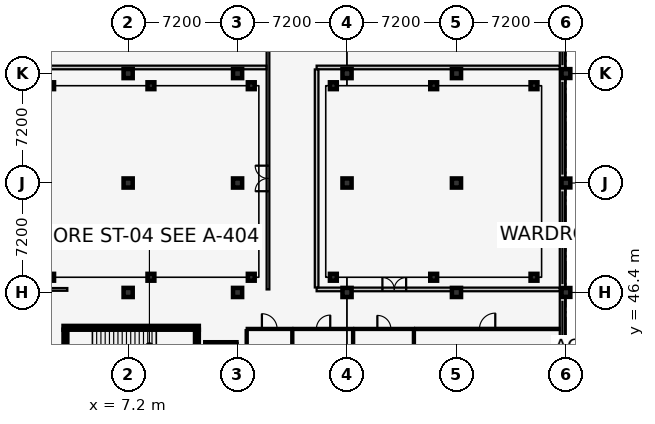
"""IFC4 building model, lengths in metres.
Left out: names, types, materials, properties, quantities, classifications, styles, units other than length and angle.
Written with IfcOpenShell. Run it as: python <this file> out.ifc"""

import sys

from ifc_helpers import new_model, si_unit, direction, frame, frame_2d, origin, origin_2d, place, context, subcontext, project, spatial, rectangle, extrude, element, fill, save


model = new_model("IFC4")
c1 = context("Model", 3, precision=1e-05, world=origin(), true_north=direction((0.0, 1.0)))
c2 = subcontext(c1, "Body", "Model", "MODEL_VIEW")
j1 = project(units=[si_unit("LENGTHUNIT", "METRE"), si_unit("PLANEANGLEUNIT", "RADIAN")], contexts=[c1])
p1 = place(None, origin())
s1 = spatial("IfcSite", under=j1, at=p1, CompositionType="ELEMENT")
p2 = place(p1, origin())
s2 = spatial("IfcBuilding", under=s1, at=p2, CompositionType="ELEMENT")
p3 = place(p2, origin())
s3 = spatial("IfcBuildingStorey", under=s2, at=p3, CompositionType="ELEMENT", Elevation=0.0)
for number, where, z_axis, x_axis in (
    (1, (7.2, 46.4, 0.0), (0.0, 0.0, 1.0), (1.0, 0.0, 0.0)),
    (2, (7.2, 53.6, 0.0), (0.0, 0.0, 1.0), (1.0, 0.0, 0.0)),
    (3, (7.2, 60.8, 0.0), (0.0, 0.0, 1.0), (1.0, 0.0, 0.0)),
    (4, (14.4, 46.4, 0.0), (0.0, 0.0, 1.0), (1.0, 0.0, 0.0)),
    (5, (14.4, 53.6, 0.0), (0.0, 0.0, 1.0), (1.0, 0.0, 0.0)),
    (6, (14.4, 60.8, 0.0), (0.0, 0.0, 1.0), (1.0, 0.0, 0.0)),
    (7, (21.6, 46.4, 0.0), (0.0, 0.0, 1.0), (1.0, 0.0, 0.0)),
    (8, (21.6, 53.6, 0.0), (0.0, 0.0, 1.0), (1.0, 0.0, 0.0)),
    (9, (21.6, 60.8, 0.0), (0.0, 0.0, 1.0), (1.0, 0.0, 0.0)),
    (10, (28.8, 46.4, 0.0), (0.0, 0.0, 1.0), (1.0, 0.0, 0.0)),
    (11, (28.8, 53.6, 0.0), (0.0, 0.0, 1.0), (1.0, 0.0, 0.0)),
    (12, (28.8, 60.8, 0.0), (0.0, 0.0, 1.0), (1.0, 0.0, 0.0)),
):
    element("IfcColumn", number, at=place(p3, frame(where, z_axis=z_axis, x_axis=x_axis)), inside=s3, PredefinedType="COLUMN", context=c2, shape_type="SweptSolid", body=[
        extrude(rectangle(XDim=0.6, YDim=0.6, at=origin_2d()), origin(), (0.0, 0.0, 1.0), 5.4),
    ])
for number, where, z_axis, x_axis in (
    (13, (36.0, 46.4, 0.0), (0.0, 0.0, 1.0), (1.0, 0.0, 0.0)),
    (14, (36.0, 53.6, 0.0), (0.0, 0.0, 1.0), (1.0, 0.0, 0.0)),
    (15, (36.0, 60.8, 0.0), (0.0, 0.0, 1.0), (1.0, 0.0, 0.0)),
):
    element("IfcColumn", number, at=place(p3, frame(where, z_axis=z_axis, x_axis=x_axis)), inside=s3, PredefinedType="COLUMN", context=c2, shape_type="SweptSolid", body=[
        extrude(rectangle(XDim=0.58, YDim=0.58, at=origin_2d()), origin(), (0.0, 0.0, 1.0), 5.4),
    ])
p4 = place(p3, frame((2.1, 47.4, -0.55), z_axis=(0.0, 0.0, 1.0), x_axis=(1.0, 0.0, 0.0)))
e16 = element("IfcColumn", 16, at=p4, inside=s3, PredefinedType="COLUMN", context=c2, shape_type="SweptSolid", body=[
    extrude(rectangle(XDim=0.45, YDim=0.45, at=origin_2d()), origin(), (0.0, 0.0, 1.0), 0.955),
])
p5 = place(p3, frame((2.1, 60.0, -0.55), z_axis=(0.0, 0.0, 1.0), x_axis=(1.0, 0.0, 0.0)))
e17 = element("IfcColumn", 17, at=p5, inside=s3, PredefinedType="COLUMN", context=c2, shape_type="SweptSolid", body=[
    extrude(rectangle(XDim=0.45, YDim=0.45, at=origin_2d()), origin(), (0.0, 0.0, 1.0), 3.625),
])
p6 = place(p3, frame((8.7, 47.4, -0.55), z_axis=(0.0, 0.0, 1.0), x_axis=(1.0, 0.0, 0.0)))
e18 = element("IfcColumn", 18, at=p6, inside=s3, PredefinedType="COLUMN", context=c2, shape_type="SweptSolid", body=[
    extrude(rectangle(XDim=0.45, YDim=0.45, at=origin_2d()), origin(), (0.0, 0.0, 1.0), 0.955),
])
p7 = place(p3, frame((8.7, 60.0, -0.55), z_axis=(0.0, 0.0, 1.0), x_axis=(1.0, 0.0, 0.0)))
e19 = element("IfcColumn", 19, at=p7, inside=s3, PredefinedType="COLUMN", context=c2, shape_type="SweptSolid", body=[
    extrude(rectangle(XDim=0.45, YDim=0.45, at=origin_2d()), origin(), (0.0, 0.0, 1.0), 3.625),
])
p8 = place(p3, frame((15.3, 47.4, -0.55), z_axis=(0.0, 0.0, 1.0), x_axis=(1.0, 0.0, 0.0)))
e20 = element("IfcColumn", 20, at=p8, inside=s3, PredefinedType="COLUMN", context=c2, shape_type="SweptSolid", body=[
    extrude(rectangle(XDim=0.45, YDim=0.45, at=origin_2d()), origin(), (0.0, 0.0, 1.0), 0.955),
])
p9 = place(p3, frame((15.3, 60.0, -0.55), z_axis=(0.0, 0.0, 1.0), x_axis=(1.0, 0.0, 0.0)))
e21 = element("IfcColumn", 21, at=p9, inside=s3, PredefinedType="COLUMN", context=c2, shape_type="SweptSolid", body=[
    extrude(rectangle(XDim=0.45, YDim=0.45, at=origin_2d()), origin(), (0.0, 0.0, 1.0), 3.625),
])
p10 = place(p3, frame((20.7, 47.4, -0.55), z_axis=(0.0, 0.0, 1.0), x_axis=(1.0, 0.0, 0.0)))
e22 = element("IfcColumn", 22, at=p10, inside=s3, PredefinedType="COLUMN", context=c2, shape_type="SweptSolid", body=[
    extrude(rectangle(XDim=0.45, YDim=0.45, at=origin_2d()), origin(), (0.0, 0.0, 1.0), 0.975),
])
p11 = place(p3, frame((20.7, 60.0, -0.55), z_axis=(0.0, 0.0, 1.0), x_axis=(1.0, 0.0, 0.0)))
e23 = element("IfcColumn", 23, at=p11, inside=s3, PredefinedType="COLUMN", context=c2, shape_type="SweptSolid", body=[
    extrude(rectangle(XDim=0.45, YDim=0.45, at=origin_2d()), origin(), (0.0, 0.0, 1.0), 3.645),
])
p12 = place(p3, frame((27.3, 47.4, -0.55), z_axis=(0.0, 0.0, 1.0), x_axis=(1.0, 0.0, 0.0)))
e24 = element("IfcColumn", 24, at=p12, inside=s3, PredefinedType="COLUMN", context=c2, shape_type="SweptSolid", body=[
    extrude(rectangle(XDim=0.45, YDim=0.45, at=origin_2d()), origin(), (0.0, 0.0, 1.0), 0.975),
])
p13 = place(p3, frame((27.3, 60.0, -0.55), z_axis=(0.0, 0.0, 1.0), x_axis=(1.0, 0.0, 0.0)))
e25 = element("IfcColumn", 25, at=p13, inside=s3, PredefinedType="COLUMN", context=c2, shape_type="SweptSolid", body=[
    extrude(rectangle(XDim=0.45, YDim=0.45, at=origin_2d()), origin(), (0.0, 0.0, 1.0), 3.645),
])
p14 = place(p3, frame((33.9, 47.4, -0.55), z_axis=(0.0, 0.0, 1.0), x_axis=(1.0, 0.0, 0.0)))
e26 = element("IfcColumn", 26, at=p14, inside=s3, PredefinedType="COLUMN", context=c2, shape_type="SweptSolid", body=[
    extrude(rectangle(XDim=0.45, YDim=0.45, at=origin_2d()), origin(), (0.0, 0.0, 1.0), 0.975),
])
p15 = place(p3, frame((33.9, 60.0, -0.55), z_axis=(0.0, 0.0, 1.0), x_axis=(1.0, 0.0, 0.0)))
e27 = element("IfcColumn", 27, at=p15, inside=s3, PredefinedType="COLUMN", context=c2, shape_type="SweptSolid", body=[
    extrude(rectangle(XDim=0.45, YDim=0.45, at=origin_2d()), origin(), (0.0, 0.0, 1.0), 3.645),
])
p16 = place(p3, frame((35.77, 68.0, 0.0), z_axis=(0.0, 0.0, 1.0), x_axis=(0.0, -1.0, 0.0)))
e28 = element("IfcWall", 28, at=p16, inside=s3, PredefinedType="SOLIDWALL", context=c2, shape_type="SweptSolid", body=[
    extrude(rectangle(XDim=28.8, YDim=0.35, at=frame_2d((14.4, 0.0))), origin(), (0.0, 0.0, 1.0), 0.85),
])
p17 = place(p3, frame((11.85, 44.075, 0.0), z_axis=(0.0, 0.0, 1.0), x_axis=(-1.0, 0.0, 0.0)))
e29 = element("IfcWall", 29, at=p17, inside=s3, PredefinedType="SHEAR", context=c2, shape_type="SweptSolid", body=[
    extrude(rectangle(XDim=8.9, YDim=0.25, at=frame_2d((4.45, 0.0))), origin(), (0.0, 0.0, 1.0), 5.14),
])
p18 = place(p3, frame((3.075, 43.95, 0.0), z_axis=(0.0, 0.0, 1.0), x_axis=(0.0, -1.0, 0.0)))
e30 = element("IfcWall", 30, at=p18, inside=s3, PredefinedType="SHEAR", context=c2, shape_type="SweptSolid", body=[
    extrude(rectangle(XDim=3.55, YDim=0.25, at=frame_2d((1.775, 0.0))), origin(), (0.0, 0.0, 1.0), 5.14),
])
p19 = place(p18, frame((1.15, 0.0, 0.0)))
e31 = element("IfcOpeningElement", 31, at=p19, cuts=e30, PredefinedType="OPENING", context=c2, shape_type="SweptSolid", body=[
    extrude(rectangle(XDim=1.25, YDim=2.15, at=frame_2d((0.625, 1.075))), frame((0.0, 0.137, 0.0), z_axis=(0.0, -1.0, 0.0), x_axis=(1.0, 0.0, 0.0)), (0.0, 0.0, 1.0), 0.274),
])
p20 = place(p3, frame((11.725, 40.4, 0.0), z_axis=(0.0, 0.0, 1.0), x_axis=(0.0, 1.0, 0.0)))
e32 = element("IfcWall", 32, at=p20, inside=s3, PredefinedType="SHEAR", context=c2, shape_type="SweptSolid", body=[
    extrude(rectangle(XDim=3.55, YDim=0.25, at=frame_2d((1.775, 0.0))), origin(), (0.0, 0.0, 1.0), 5.14),
])
p21 = place(p3, frame((14.325, 43.0, 0.0), z_axis=(0.0, 0.0, 1.0), x_axis=(-1.0, 0.0, 0.0)))
e33 = element("IfcWall", 33, at=p21, inside=s3, PredefinedType="SHEAR", context=c2, shape_type="SweptSolid", body=[
    extrude(rectangle(XDim=2.05, YDim=0.25, at=frame_2d((1.025, 0.0))), origin(), (0.0, 0.0, 1.0), 5.14),
])
p22 = place(p21, frame((0.55, 0.0, 0.0)))
e34 = element("IfcOpeningElement", 34, at=p22, cuts=e33, PredefinedType="OPENING", context=c2, shape_type="SweptSolid", body=[
    extrude(rectangle(XDim=0.95, YDim=2.1, at=frame_2d((0.475, 1.05))), frame((0.0, 0.137, 0.0), z_axis=(0.0, -1.0, 0.0), x_axis=(1.0, 0.0, 0.0)), (0.0, 0.0, 1.0), 0.274),
])
p23 = place(p3, frame((0.47, 46.6, 0.0), z_axis=(0.0, 0.0, 1.0), x_axis=(1.0, 0.0, 0.0)))
e35 = element("IfcWall", 35, at=p23, inside=s3, PredefinedType="PARTITIONING", context=c2, shape_type="SweptSolid", body=[
    extrude(rectangle(XDim=2.73, YDim=0.18, at=frame_2d((1.365, 0.0))), origin(), (0.0, 0.0, 1.0), 4.465),
])
p24 = place(p3, frame((16.4, 46.6, 0.0), z_axis=(0.0, 0.0, 1.0), x_axis=(0.0, 1.0, 0.0)))
e36 = element("IfcWall", 36, at=p24, inside=s3, PredefinedType="PARTITIONING", context=c2, shape_type="SweptSolid", body=[
    extrude(rectangle(XDim=20.93, YDim=0.18, at=frame_2d((10.465, 0.0))), origin(), (0.0, 0.0, 1.0), 5.14),
])
p25 = place(p24, frame((6.46, 0.0, 0.0)))
e37 = element("IfcOpeningElement", 37, at=p25, cuts=e36, PredefinedType="OPENING", context=c2, shape_type="SweptSolid", body=[
    extrude(rectangle(XDim=1.68, YDim=2.3, at=frame_2d((0.84, 1.15))), frame((0.0, 0.102, 0.0), z_axis=(0.0, -1.0, 0.0), x_axis=(1.0, 0.0, 0.0)), (0.0, 0.0, 1.0), 0.204),
])
p26 = place(p24, frame((17.125, 0.0, 0.0)))
e38 = element("IfcOpeningElement", 38, at=p26, cuts=e36, PredefinedType="OPENING", context=c2, shape_type="SweptSolid", body=[
    extrude(rectangle(XDim=1.28, YDim=2.2, at=frame_2d((0.64, 1.1))), frame((0.0, 0.102, 0.0), z_axis=(0.0, -1.0, 0.0), x_axis=(1.0, 0.0, 0.0)), (0.0, 0.0, 1.0), 0.204),
])
p27 = place(p3, frame((0.47, 61.2, 0.0), z_axis=(0.0, 0.0, 1.0), x_axis=(1.0, 0.0, 0.0)))
e39 = element("IfcWall", 39, at=p27, inside=s3, PredefinedType="PARTITIONING", context=c2, shape_type="SweptSolid", body=[
    extrude(rectangle(XDim=15.83, YDim=0.24, at=frame_2d((7.915, 0.0))), origin(), (0.0, 0.0, 1.0), 5.14),
])
p28 = place(p3, frame((19.6, 46.6, 0.0), z_axis=(0.0, 0.0, 1.0), x_axis=(1.0, 0.0, 0.0)))
e40 = element("IfcWall", 40, at=p28, inside=s3, PredefinedType="PARTITIONING", context=c2, shape_type="SweptSolid", body=[
    extrude(rectangle(XDim=15.985, YDim=0.24, at=frame_2d((7.992, 0.0))), origin(), (0.0, 0.0, 1.0), 4.265),
])
p29 = place(p28, frame((4.327, 0.0, 0.0)))
e41 = element("IfcOpeningElement", 41, at=p29, cuts=e40, PredefinedType="OPENING", context=c2, shape_type="SweptSolid", body=[
    extrude(rectangle(XDim=1.56, YDim=2.25, at=frame_2d((0.78, 1.125))), frame((0.0, 0.132, 0.0), z_axis=(0.0, -1.0, 0.0), x_axis=(1.0, 0.0, 0.0)), (0.0, 0.0, 1.0), 0.264),
])
p30 = place(p3, frame((19.6, 61.2, 0.0), z_axis=(0.0, 0.0, 1.0), x_axis=(1.0, 0.0, 0.0)))
e42 = element("IfcWall", 42, at=p30, inside=s3, PredefinedType="PARTITIONING", context=c2, shape_type="SweptSolid", body=[
    extrude(rectangle(XDim=15.985, YDim=0.24, at=frame_2d((7.992, 0.0))), origin(), (0.0, 0.0, 1.0), 4.265),
])
p31 = place(p3, frame((19.6, 46.73, 0.0), z_axis=(0.0, 0.0, 1.0), x_axis=(0.0, 1.0, 0.0)))
e43 = element("IfcWall", 43, at=p31, inside=s3, PredefinedType="PARTITIONING", context=c2, shape_type="SweptSolid", body=[
    extrude(rectangle(XDim=14.34, YDim=0.24, at=frame_2d((7.17, 0.0))), origin(), (0.0, 0.0, 1.0), 5.14),
])
p32 = place(p3, frame((15.0, 44.0, 0.0), z_axis=(0.0, 0.0, 1.0), x_axis=(1.0, 0.0, 0.0)))
e44 = element("IfcWall", 44, at=p32, inside=s3, PredefinedType="PARTITIONING", context=c2, shape_type="SweptSolid", body=[
    extrude(rectangle(XDim=3.0, YDim=0.14, at=frame_2d((1.5, 0.0))), origin(), (0.0, 0.0, 1.0), 5.14),
])
p33 = place(p32, frame((1.0, 0.0, 0.0)))
e45 = element("IfcOpeningElement", 45, at=p33, cuts=e44, PredefinedType="OPENING", context=c2, shape_type="SweptSolid", body=[
    extrude(rectangle(XDim=1.0, YDim=2.1, at=frame_2d((0.5, 1.05))), frame((0.0, 0.082, 0.0), z_axis=(0.0, -1.0, 0.0), x_axis=(1.0, 0.0, 0.0)), (0.0, 0.0, 1.0), 0.164),
])
p34 = place(p3, frame((15.0, 39.67, 0.0), z_axis=(0.0, 0.0, 1.0), x_axis=(0.0, 1.0, 0.0)))
e46 = element("IfcWall", 46, at=p34, inside=s3, PredefinedType="PARTITIONING", context=c2, shape_type="SweptSolid", body=[
    extrude(rectangle(XDim=4.25, YDim=0.14, at=frame_2d((2.125, 0.0))), origin(), (0.0, 0.0, 1.0), 5.14),
])
p35 = place(p3, frame((18.0, 39.67, 0.0), z_axis=(0.0, 0.0, 1.0), x_axis=(0.0, 1.0, 0.0)))
e47 = element("IfcWall", 47, at=p35, inside=s3, PredefinedType="PARTITIONING", context=c2, shape_type="SweptSolid", body=[
    extrude(rectangle(XDim=4.25, YDim=0.14, at=frame_2d((2.125, 0.0))), origin(), (0.0, 0.0, 1.0), 4.665),
])
p36 = place(p3, frame((18.08, 44.0, 0.0), z_axis=(0.0, 0.0, 1.0), x_axis=(1.0, 0.0, 0.0)))
e48 = element("IfcWall", 48, at=p36, inside=s3, PredefinedType="PARTITIONING", context=c2, shape_type="SweptSolid", body=[
    extrude(rectangle(XDim=3.92, YDim=0.14, at=frame_2d((1.96, 0.0))), origin(), (0.0, 0.0, 1.0), 5.14),
])
p37 = place(p36, frame((1.505, 0.0, 0.0)))
e49 = element("IfcOpeningElement", 49, at=p37, cuts=e48, PredefinedType="OPENING", context=c2, shape_type="SweptSolid", body=[
    extrude(rectangle(XDim=0.91, YDim=2.06, at=frame_2d((0.455, 1.03))), frame((0.0, 0.082, 0.0), z_axis=(0.0, -1.0, 0.0), x_axis=(1.0, 0.0, 0.0)), (0.0, 0.0, 1.0), 0.164),
])
p38 = place(p3, frame((22.0, 39.67, 0.0), z_axis=(0.0, 0.0, 1.0), x_axis=(0.0, 1.0, 0.0)))
e50 = element("IfcWall", 50, at=p38, inside=s3, PredefinedType="PARTITIONING", context=c2, shape_type="SweptSolid", body=[
    extrude(rectangle(XDim=4.25, YDim=0.14, at=frame_2d((2.125, 0.0))), origin(), (0.0, 0.0, 1.0), 5.14),
])
p39 = place(p3, frame((22.08, 44.0, 0.0), z_axis=(0.0, 0.0, 1.0), x_axis=(1.0, 0.0, 0.0)))
e51 = element("IfcWall", 51, at=p39, inside=s3, PredefinedType="PARTITIONING", context=c2, shape_type="SweptSolid", body=[
    extrude(rectangle(XDim=3.92, YDim=0.14, at=frame_2d((1.96, 0.0))), origin(), (0.0, 0.0, 1.0), 5.14),
])
p40 = place(p39, frame((1.515, 0.0, 0.0)))
e52 = element("IfcOpeningElement", 52, at=p40, cuts=e51, PredefinedType="OPENING", context=c2, shape_type="SweptSolid", body=[
    extrude(rectangle(XDim=0.89, YDim=2.05, at=frame_2d((0.445, 1.025))), frame((0.0, 0.082, 0.0), z_axis=(0.0, -1.0, 0.0), x_axis=(1.0, 0.0, 0.0)), (0.0, 0.0, 1.0), 0.164),
])
p41 = place(p3, frame((26.0, 39.67, 0.0), z_axis=(0.0, 0.0, 1.0), x_axis=(0.0, 1.0, 0.0)))
e53 = element("IfcWall", 53, at=p41, inside=s3, PredefinedType="PARTITIONING", context=c2, shape_type="SweptSolid", body=[
    extrude(rectangle(XDim=4.25, YDim=0.14, at=frame_2d((2.125, 0.0))), origin(), (0.0, 0.0, 1.0), 5.14),
])
p42 = place(p3, frame((26.08, 44.0, 0.0), z_axis=(0.0, 0.0, 1.0), x_axis=(1.0, 0.0, 0.0)))
e54 = element("IfcWall", 54, at=p42, inside=s3, PredefinedType="PARTITIONING", context=c2, shape_type="SweptSolid", body=[
    extrude(rectangle(XDim=9.505, YDim=0.15, at=frame_2d((4.752, 0.0))), origin(), (0.0, 0.0, 1.0), 5.14),
])
p43 = place(p42, frame((4.232, 0.0, 0.0)))
e55 = element("IfcOpeningElement", 55, at=p43, cuts=e54, PredefinedType="OPENING", context=c2, shape_type="SweptSolid", body=[
    extrude(rectangle(XDim=1.04, YDim=2.15, at=frame_2d((0.52, 1.075))), frame((0.0, 0.087, 0.0), z_axis=(0.0, -1.0, 0.0), x_axis=(1.0, 0.0, 0.0)), (0.0, 0.0, 1.0), 0.174),
])
p44 = place(p22, origin())
e56 = element("IfcDoor", 56, at=p44, inside=s3, OperationType="SLIDING_TO_LEFT", PredefinedType="DOOR", context=c2, shape_type="SweptSolid", body=[
    extrude(rectangle(XDim=0.95, YDim=2.1, at=frame_2d((0.475, 1.05))), frame((0.0, 0.025, 0.0), z_axis=(0.0, -1.0, 0.0), x_axis=(1.0, 0.0, 0.0)), (0.0, 0.0, 1.0), 0.05),
])
fill(e34, e56)
p45 = place(p25, origin())
e57 = element("IfcDoor", 57, at=p45, inside=s3, OperationType="DOUBLE_DOOR_SINGLE_SWING", PredefinedType="DOOR", context=c2, shape_type="SweptSolid", body=[
    extrude(rectangle(XDim=1.68, YDim=2.3, at=frame_2d((0.84, 1.15))), frame((0.0, 0.025, 0.0), z_axis=(0.0, -1.0, 0.0), x_axis=(1.0, 0.0, 0.0)), (0.0, 0.0, 1.0), 0.05),
])
fill(e37, e57)
p46 = place(p29, origin())
e58 = element("IfcDoor", 58, at=p46, inside=s3, OperationType="DOUBLE_DOOR_SINGLE_SWING", PredefinedType="DOOR", context=c2, shape_type="SweptSolid", body=[
    extrude(rectangle(XDim=1.56, YDim=2.25, at=frame_2d((0.78, 1.125))), frame((0.0, 0.025, 0.0), z_axis=(0.0, -1.0, 0.0), x_axis=(1.0, 0.0, 0.0)), (0.0, 0.0, 1.0), 0.05),
])
fill(e41, e58)
p47 = place(p33, origin())
e59 = element("IfcDoor", 59, at=p47, inside=s3, OperationType="SINGLE_SWING_LEFT", PredefinedType="DOOR", context=c2, shape_type="SweptSolid", body=[
    extrude(rectangle(XDim=1.0, YDim=2.1, at=frame_2d((0.5, 1.05))), frame((0.0, 0.025, 0.0), z_axis=(0.0, -1.0, 0.0), x_axis=(1.0, 0.0, 0.0)), (0.0, 0.0, 1.0), 0.05),
])
fill(e45, e59)
p48 = place(p37, origin())
e60 = element("IfcDoor", 60, at=p48, inside=s3, OperationType="SINGLE_SWING_RIGHT", PredefinedType="DOOR", context=c2, shape_type="SweptSolid", body=[
    extrude(rectangle(XDim=0.91, YDim=2.06, at=frame_2d((0.455, 1.03))), frame((0.0, 0.025, 0.0), z_axis=(0.0, -1.0, 0.0), x_axis=(1.0, 0.0, 0.0)), (0.0, 0.0, 1.0), 0.05),
])
fill(e49, e60)
p49 = place(p40, origin())
e61 = element("IfcDoor", 61, at=p49, inside=s3, OperationType="SINGLE_SWING_LEFT", PredefinedType="DOOR", context=c2, shape_type="SweptSolid", body=[
    extrude(rectangle(XDim=0.89, YDim=2.05, at=frame_2d((0.445, 1.025))), frame((0.0, 0.025, 0.0), z_axis=(0.0, -1.0, 0.0), x_axis=(1.0, 0.0, 0.0)), (0.0, 0.0, 1.0), 0.05),
])
fill(e52, e61)
p50 = place(p43, origin())
e62 = element("IfcDoor", 62, at=p50, inside=s3, OperationType="SINGLE_SWING_RIGHT", PredefinedType="DOOR", context=c2, shape_type="SweptSolid", body=[
    extrude(rectangle(XDim=1.04, YDim=2.15, at=frame_2d((0.52, 1.075))), frame((0.0, 0.025, 0.0), z_axis=(0.0, -1.0, 0.0), x_axis=(1.0, 0.0, 0.0)), (0.0, 0.0, 1.0), 0.05),
])
fill(e55, e62)
save(model, sys.argv[1])
